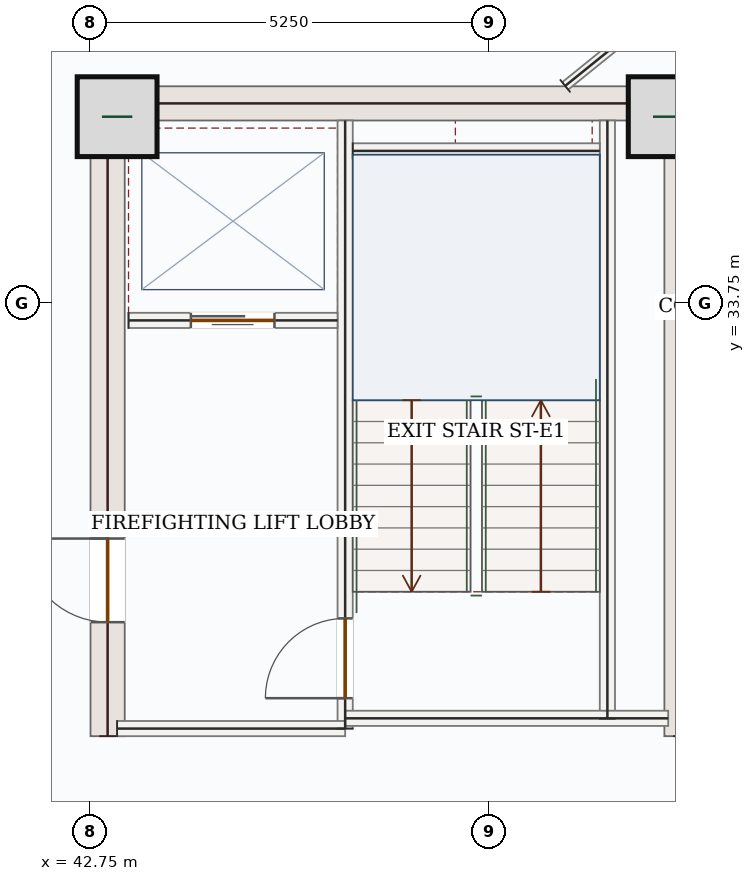
"""IFC4 building model, lengths in metres.
Left out: names, types, materials, properties, quantities, classifications, styles, units other than length and angle.
Written with IfcOpenShell. Run it as: python <this file> out.ifc"""

import sys

from ifc_helpers import new_model, si_unit, direction, frame, frame_2d, origin, origin_2d, place, context, subcontext, project, spatial, rectangle, extrude, source, transform, mapped, element, fill, save


model = new_model("IFC4")
c1 = context("Model", 3, precision=1e-05, world=origin(), true_north=direction((0.0, 1.0)))
c2 = subcontext(c1, "Body", "Model", "MODEL_VIEW")
j1 = project(units=[si_unit("LENGTHUNIT", "METRE"), si_unit("PLANEANGLEUNIT", "RADIAN")], contexts=[c1])
p1 = place(None, origin())
s1 = spatial("IfcSite", under=j1, at=p1, CompositionType="ELEMENT")
p2 = place(p1, origin())
s2 = spatial("IfcBuilding", under=s1, at=p2, CompositionType="ELEMENT")
p3 = place(p2, frame((0.0, 0.0, 287.85)))
s3 = spatial("IfcBuildingStorey", under=s2, at=p3, CompositionType="ELEMENT", Elevation=287.85)
p4 = place(p3, frame((42.975, 28.05, 0.0), z_axis=(0.0, 0.0, 1.0), x_axis=(0.0, 1.0, 0.0)))
e1 = element("IfcWall", 1, at=p4, inside=s3, PredefinedType="SHEAR", context=c2, shape_type="SweptSolid", body=[
    extrude(rectangle(XDim=8.55, YDim=0.45, at=frame_2d((4.275, 0.0))), origin(), (0.0, 0.0, 1.0), 3.5),
])
p5 = place(p4, frame((1.5, 0.0, 0.0)))
e2 = element("IfcOpeningElement", 2, at=p5, cuts=e1, PredefinedType="OPENING", context=c2, shape_type="SweptSolid", body=[
    extrude(rectangle(XDim=1.1, YDim=2.2, at=frame_2d((0.55, 1.1))), frame((0.0, 0.235, 0.0), z_axis=(0.0, -1.0, 0.0), x_axis=(1.0, 0.0, 0.0)), (0.0, 0.0, 1.0), 0.47),
])
m1 = source(origin(), c2, "Body", "SweptSolid", [
    extrude(rectangle(XDim=8.55, YDim=0.45, at=frame_2d((4.275, 0.0))), origin(), (0.0, 0.0, 1.0), 3.5),
])
p6 = place(p3, frame((50.525, 28.05, 0.0), z_axis=(0.0, 0.0, 1.0), x_axis=(0.0, 1.0, 0.0)))
e3 = element("IfcWall", 3, at=p6, inside=s3, PredefinedType="SHEAR", context=c2, shape_type="MappedRepresentation", body=[
    mapped(m1, transform((0.0, 0.0, 0.0), x_axis=(1.0, 0.0, 0.0), y_axis=(0.0, 1.0, 0.0), z_axis=(0.0, 0.0, 1.0), scale=1.0)),
])
m2 = source(origin(), c2, "Body", "SweptSolid", [
    extrude(rectangle(XDim=7.1, YDim=0.45, at=frame_2d((3.55, 0.0))), origin(), (0.0, 0.0, 1.0), 3.5),
])
p7 = place(p3, frame((43.2, 36.375, 0.0), z_axis=(0.0, 0.0, 1.0), x_axis=(1.0, 0.0, 0.0)))
e4 = element("IfcWall", 4, at=p7, inside=s3, PredefinedType="SHEAR", context=c2, shape_type="MappedRepresentation", body=[
    mapped(m2, transform((0.0, 0.0, 0.0), x_axis=(1.0, 0.0, 0.0), y_axis=(0.0, 1.0, 0.0), z_axis=(0.0, 0.0, 1.0), scale=1.0)),
])
m3 = source(origin(), c2, "Body", "SweptSolid", [
    extrude(rectangle(XDim=1.05, YDim=1.05, at=origin_2d()), origin(), (0.0, 0.0, 1.0), 3.75),
])
for number, where, z_axis, x_axis in (
    (5, (43.1, 36.2, 0.0), (0.0, 0.0, 1.0), (1.0, 0.0, 0.0)),
    (6, (50.35, 36.2, 0.0), (0.0, 0.0, 1.0), (1.0, 0.0, 0.0)),
):
    element("IfcColumn", number, at=place(p3, frame(where, z_axis=z_axis, x_axis=x_axis)), inside=s3, PredefinedType="COLUMN", context=c2, shape_type="MappedRepresentation", body=[
        mapped(m3, transform((0.0, 0.0, 0.0), x_axis=(1.0, 0.0, 0.0), y_axis=(0.0, 1.0, 0.0), z_axis=(0.0, 0.0, 1.0), scale=1.0)),
    ])
p8 = place(p3, frame((50.26, 38.342, 0.0), z_axis=(0.0, 0.0, 1.0), x_axis=(0.707106781187, -0.707106781187, 0.0)))
e7 = element("IfcWall", 7, at=p8, inside=s3, PredefinedType="SOLIDWALL", context=c2, shape_type="SweptSolid", body=[
    extrude(rectangle(XDim=3.96, YDim=0.28, at=frame_2d((1.98, 0.0))), origin(), (0.0, 0.0, 1.0), 3.5),
])
p9 = place(p8, frame((1.23, 0.0, 0.85)))
e8 = element("IfcOpeningElement", 8, at=p9, cuts=e7, PredefinedType="OPENING", context=c2, shape_type="SweptSolid", body=[
    extrude(rectangle(XDim=1.5, YDim=1.5, at=frame_2d((0.75, 0.75))), frame((0.0, 0.15, 0.0), z_axis=(0.0, -1.0, 0.0), x_axis=(1.0, 0.0, 0.0)), (0.0, 0.0, 1.0), 0.3),
])
m4 = source(origin(), c2, "Body", "SweptSolid", [
    extrude(rectangle(XDim=7.87, YDim=0.2, at=frame_2d((3.935, 0.0))), origin(), (0.0, 0.0, 1.0), 3.5),
])
p10 = place(p3, frame((49.55, 28.28, 0.0), z_axis=(0.0, 0.0, 1.0), x_axis=(0.0, 1.0, 0.0)))
e9 = element("IfcWall", 9, at=p10, inside=s3, PredefinedType="SOLIDWALL", context=c2, shape_type="MappedRepresentation", body=[
    mapped(m4, transform((0.0, 0.0, 0.0), x_axis=(1.0, 0.0, 0.0), y_axis=(0.0, 1.0, 0.0), z_axis=(0.0, 0.0, 1.0), scale=1.0)),
])
p11 = place(p3, frame((46.1, 28.15, 0.0), z_axis=(0.0, 0.0, 1.0), x_axis=(0.0, 1.0, 0.0)))
e10 = element("IfcWall", 10, at=p11, inside=s3, PredefinedType="SOLIDWALL", context=c2, shape_type="SweptSolid", body=[
    extrude(rectangle(XDim=8.0, YDim=0.2, at=frame_2d((4.0, 0.0))), origin(), (0.0, 0.0, 1.0), 3.5),
])
p12 = place(p11, frame((0.4, 0.0, 0.0)))
e11 = element("IfcOpeningElement", 11, at=p12, cuts=e10, PredefinedType="OPENING", context=c2, shape_type="SweptSolid", body=[
    extrude(rectangle(XDim=1.05, YDim=2.15, at=frame_2d((0.525, 1.075))), frame((0.0, 0.11, 0.0), z_axis=(0.0, -1.0, 0.0), x_axis=(1.0, 0.0, 0.0)), (0.0, 0.0, 1.0), 0.22),
])
m5 = source(origin(), c2, "Body", "SweptSolid", [
    extrude(rectangle(XDim=3.0, YDim=0.2, at=frame_2d((1.5, 0.0))), origin(), (0.0, 0.0, 1.0), 3.5),
])
p13 = place(p3, frame((43.1, 28.15, 0.0), z_axis=(0.0, 0.0, 1.0), x_axis=(1.0, 0.0, 0.0)))
e12 = element("IfcWall", 12, at=p13, inside=s3, PredefinedType="SOLIDWALL", context=c2, shape_type="MappedRepresentation", body=[
    mapped(m5, transform((0.0, 0.0, 0.0), x_axis=(1.0, 0.0, 0.0), y_axis=(0.0, 1.0, 0.0), z_axis=(0.0, 0.0, 1.0), scale=1.0)),
])
m6 = source(origin(), c2, "Body", "SweptSolid", [
    extrude(rectangle(XDim=4.25, YDim=0.2, at=frame_2d((2.125, 0.0))), origin(), (0.0, 0.0, 1.0), 3.5),
])
p14 = place(p3, frame((46.1, 28.285, 0.0), z_axis=(0.0, 0.0, 1.0), x_axis=(1.0, 0.0, 0.0)))
e13 = element("IfcWall", 13, at=p14, inside=s3, PredefinedType="SOLIDWALL", context=c2, shape_type="MappedRepresentation", body=[
    mapped(m6, transform((0.0, 0.0, 0.0), x_axis=(1.0, 0.0, 0.0), y_axis=(0.0, 1.0, 0.0), z_axis=(0.0, 0.0, 1.0), scale=1.0)),
])
m7 = source(origin(), c2, "Body", "SweptSolid", [
    extrude(rectangle(XDim=3.25, YDim=0.2, at=frame_2d((1.625, 0.0))), origin(), (0.0, 0.0, 1.0), 3.5),
])
p15 = place(p3, frame((46.2, 35.75, 0.0), z_axis=(0.0, 0.0, 1.0), x_axis=(1.0, 0.0, 0.0)))
e14 = element("IfcWall", 14, at=p15, inside=s3, PredefinedType="SOLIDWALL", context=c2, shape_type="MappedRepresentation", body=[
    mapped(m7, transform((0.0, 0.0, 0.0), x_axis=(1.0, 0.0, 0.0), y_axis=(0.0, 1.0, 0.0), z_axis=(0.0, 0.0, 1.0), scale=1.0)),
])
p16 = place(p3, frame((43.25, 33.52, 0.0), z_axis=(0.0, 0.0, 1.0), x_axis=(1.0, 0.0, 0.0)))
e15 = element("IfcWall", 15, at=p16, inside=s3, PredefinedType="SOLIDWALL", context=c2, shape_type="SweptSolid", body=[
    extrude(rectangle(XDim=2.75, YDim=0.2, at=frame_2d((1.375, 0.0))), origin(), (0.0, 0.0, 1.0), 3.5),
])
p17 = place(p16, frame((0.82, 0.0, 0.0)))
e16 = element("IfcOpeningElement", 16, at=p17, cuts=e15, PredefinedType="OPENING", context=c2, shape_type="SweptSolid", body=[
    extrude(rectangle(XDim=1.1, YDim=2.15, at=frame_2d((0.55, 1.075))), frame((0.0, 0.11, 0.0), z_axis=(0.0, -1.0, 0.0), x_axis=(1.0, 0.0, 0.0)), (0.0, 0.0, 1.0), 0.22),
])
m8 = source(origin(), c2, "Body", "SweptSolid", [
    extrude(rectangle(XDim=1.989, YDim=0.125, at=frame_2d((0.995, 0.0))), origin(), (0.0, 0.0, 1.0), 3.5),
])
p18 = place(p3, frame((48.995, 36.605, 0.0), z_axis=(0.0, 0.0, 1.0), x_axis=(0.778058853423, 0.628191388519, 0.0)))
e17 = element("IfcWall", 17, at=p18, inside=s3, PredefinedType="PARTITIONING", context=c2, shape_type="MappedRepresentation", body=[
    mapped(m8, transform((0.0, 0.0, 0.0), x_axis=(1.0, 0.0, 0.0), y_axis=(0.0, 1.0, 0.0), z_axis=(0.0, 0.0, 1.0), scale=1.0)),
])
m9 = source(origin(), c2, "Body", "SweptSolid", [
    extrude(rectangle(XDim=1.05, YDim=2.15, at=frame_2d((0.525, 1.075))), frame((0.0, 0.025, 0.0), z_axis=(0.0, -1.0, 0.0), x_axis=(1.0, 0.0, 0.0)), (0.0, 0.0, 1.0), 0.05),
])
p19 = place(p12, origin())
e18 = element("IfcDoor", 18, at=p19, inside=s3, OperationType="SINGLE_SWING_LEFT", PredefinedType="DOOR", context=c2, shape_type="MappedRepresentation", body=[
    mapped(m9, transform((0.0, 0.0, 0.0), x_axis=(1.0, 0.0, 0.0), y_axis=(0.0, 1.0, 0.0), z_axis=(0.0, 0.0, 1.0), scale=1.0)),
])
fill(e11, e18)
m10 = source(origin(), c2, "Body", "SweptSolid", [
    extrude(rectangle(XDim=1.1, YDim=2.15, at=frame_2d((0.55, 1.075))), frame((0.0, 0.025, 0.0), z_axis=(0.0, -1.0, 0.0), x_axis=(1.0, 0.0, 0.0)), (0.0, 0.0, 1.0), 0.05),
])
p20 = place(p17, origin())
e19 = element("IfcDoor", 19, at=p20, inside=s3, OperationType="DOUBLE_DOOR_SLIDING", PredefinedType="DOOR", context=c2, shape_type="MappedRepresentation", body=[
    mapped(m10, transform((0.0, 0.0, 0.0), x_axis=(1.0, 0.0, 0.0), y_axis=(0.0, 1.0, 0.0), z_axis=(0.0, 0.0, 1.0), scale=1.0)),
])
fill(e16, e19)
m11 = source(origin(), c2, "Body", "SweptSolid", [
    extrude(rectangle(XDim=1.1, YDim=2.2, at=frame_2d((0.55, 1.1))), frame((0.0, 0.025, 0.0), z_axis=(0.0, -1.0, 0.0), x_axis=(1.0, 0.0, 0.0)), (0.0, 0.0, 1.0), 0.05),
])
p21 = place(p5, origin())
e20 = element("IfcDoor", 20, at=p21, inside=s3, OperationType="SINGLE_SWING_RIGHT", PredefinedType="DOOR", context=c2, shape_type="MappedRepresentation", body=[
    mapped(m11, transform((0.0, 0.0, 0.0), x_axis=(1.0, 0.0, 0.0), y_axis=(0.0, 1.0, 0.0), z_axis=(0.0, 0.0, 1.0), scale=1.0)),
])
fill(e2, e20)
save(model, sys.argv[1])
